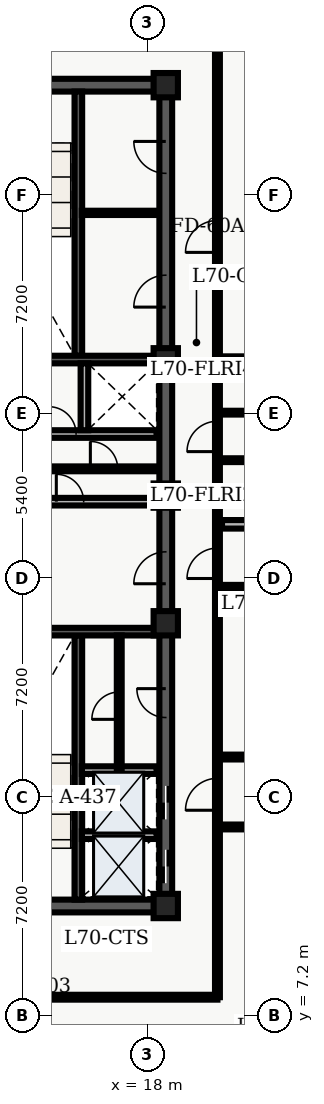
"""IFC4 building model, lengths in metres.
Left out: names, types, materials, properties, quantities, classifications, styles, units other than length and angle.
Written with IfcOpenShell. Run it as: python <this file> out.ifc"""

import sys

from ifc_helpers import new_model, entity, si_unit, converted_unit, direction, frame, origin_with_axes, origin_2d_with_axis, place, context, subcontext, project, spatial, polyline, rectangle, outline, extrude, element, fill, save


model = new_model("IFC4")
c1 = context("Model", 3, precision=1e-05, world=origin_with_axes(), true_north=direction((0.0, 1.0)))
c2 = subcontext(c1, "Body", "Model", "MODEL_VIEW")
j1 = project(units=[si_unit("LENGTHUNIT", "METRE"), converted_unit("PLANEANGLEUNIT", "DEGREE", entity("IfcPlaneAngleMeasure", 0.017), si_unit("PLANEANGLEUNIT", "RADIAN"), dimensions=[0, 0, 0, 0, 0, 0, 0])], contexts=[c1])
p1 = place(None, origin_with_axes())
s1 = spatial("IfcSite", under=j1, at=p1, CompositionType="ELEMENT")
p2 = place(p1, origin_with_axes())
s2 = spatial("IfcBuilding", under=s1, at=p2, CompositionType="ELEMENT")
p3 = place(p2, frame((0.0, 0.0, 284.1), z_axis=(0.0, 0.0, 1.0), x_axis=(1.0, 0.0, 0.0)))
s3 = spatial("IfcBuildingStorey", under=s2, at=p3, CompositionType="ELEMENT", Elevation=284.1)
p4 = place(p3, frame((11.4, 10.8, 0.0), z_axis=(0.0, 0.0, 1.0), x_axis=(1.0, 0.0, 0.0)))
e1 = element("IfcWall", 1, at=p4, inside=s3, PredefinedType="SHEAR", context=c2, shape_type="SweptSolid", body=[
    extrude(outline(polyline([(0.0, -0.21), (7.2, -0.21), (7.2, 0.21), (0.0, 0.21), (0.0, -0.21)])), origin_with_axes(), (0.0, 0.0, 1.0), 3.6),
])
p5 = place(p4, frame((2.625, 0.0, 0.0), z_axis=(0.0, 0.0, 1.0), x_axis=(1.0, 0.0, 0.0)))
e2 = element("IfcOpeningElement", 2, at=p5, cuts=e1, PredefinedType="OPENING", context=c2, shape_type="SweptSolid", body=[
    extrude(rectangle(XDim=1.05, YDim=0.44, at=origin_2d_with_axis()), origin_with_axes(), (0.0, 0.0, 1.0), 2.15),
])
p6 = place(p3, frame((11.4, 37.8, 0.0), z_axis=(0.0, 0.0, 1.0), x_axis=(1.0, 0.0, 0.0)))
e3 = element("IfcWall", 3, at=p6, inside=s3, PredefinedType="SHEAR", context=c2, shape_type="SweptSolid", body=[
    extrude(outline(polyline([(0.0, -0.21), (7.2, -0.21), (7.2, 0.21), (0.0, 0.21), (0.0, -0.21)])), origin_with_axes(), (0.0, 0.0, 1.0), 3.6),
])
p7 = place(p6, frame((2.625, 0.0, 0.0), z_axis=(0.0, 0.0, 1.0), x_axis=(1.0, 0.0, 0.0)))
e4 = element("IfcOpeningElement", 4, at=p7, cuts=e3, PredefinedType="OPENING", context=c2, shape_type="SweptSolid", body=[
    extrude(rectangle(XDim=1.05, YDim=0.44, at=origin_2d_with_axis()), origin_with_axes(), (0.0, 0.0, 1.0), 2.15),
])
p8 = place(p3, frame((18.6, 10.8, 0.0), z_axis=(0.0, 0.0, 1.0), x_axis=(0.0, 1.0, 0.0)))
e5 = element("IfcWall", 5, at=p8, inside=s3, PredefinedType="SHEAR", context=c2, shape_type="SweptSolid", body=[
    extrude(outline(polyline([(0.0, -0.21), (13.5, -0.21), (13.5, 0.21), (0.0, 0.21), (0.0, -0.21)])), origin_with_axes(), (0.0, 0.0, 1.0), 3.6),
])
p9 = place(p8, frame((1.3, 0.0, 0.0), z_axis=(0.0, 0.0, 1.0), x_axis=(1.0, 0.0, 0.0)))
e6 = element("IfcOpeningElement", 6, at=p9, cuts=e5, PredefinedType="OPENING", context=c2, shape_type="SweptSolid", body=[
    extrude(rectangle(XDim=1.1, YDim=0.44, at=origin_2d_with_axis()), origin_with_axes(), (0.0, 0.0, 1.0), 2.15),
])
p10 = place(p8, frame((3.4, 0.0, 0.0), z_axis=(0.0, 0.0, 1.0), x_axis=(1.0, 0.0, 0.0)))
e7 = element("IfcOpeningElement", 7, at=p10, cuts=e5, PredefinedType="OPENING", context=c2, shape_type="SweptSolid", body=[
    extrude(rectangle(XDim=1.1, YDim=0.44, at=origin_2d_with_axis()), origin_with_axes(), (0.0, 0.0, 1.0), 2.15),
])
p11 = place(p8, frame((11.125, 0.0, 0.0), z_axis=(0.0, 0.0, 1.0), x_axis=(1.0, 0.0, 0.0)))
e8 = element("IfcOpeningElement", 8, at=p11, cuts=e5, PredefinedType="OPENING", context=c2, shape_type="SweptSolid", body=[
    extrude(rectangle(XDim=1.05, YDim=0.44, at=origin_2d_with_axis()), origin_with_axes(), (0.0, 0.0, 1.0), 2.15),
])
p12 = place(p8, frame((6.675, 0.0, 0.0), z_axis=(0.0, 0.0, 1.0), x_axis=(1.0, 0.0, 0.0)))
e9 = element("IfcOpeningElement", 9, at=p12, cuts=e5, PredefinedType="OPENING", context=c2, shape_type="SweptSolid", body=[
    extrude(rectangle(XDim=0.95, YDim=0.44, at=origin_2d_with_axis()), origin_with_axes(), (0.0, 0.0, 1.0), 2.15),
])
p13 = place(p3, frame((18.6, 24.3, 0.0), z_axis=(0.0, 0.0, 1.0), x_axis=(0.0, 1.0, 0.0)))
e10 = element("IfcWall", 10, at=p13, inside=s3, PredefinedType="SHEAR", context=c2, shape_type="SweptSolid", body=[
    extrude(outline(polyline([(0.0, -0.21), (13.5, -0.21), (13.5, 0.21), (0.0, 0.21), (0.0, -0.21)])), origin_with_axes(), (0.0, 0.0, 1.0), 3.6),
])
p14 = place(p13, frame((6.725, 0.0, 0.0), z_axis=(0.0, 0.0, 1.0), x_axis=(1.0, 0.0, 0.0)))
e11 = element("IfcOpeningElement", 11, at=p14, cuts=e10, PredefinedType="OPENING", context=c2, shape_type="SweptSolid", body=[
    extrude(rectangle(XDim=1.05, YDim=0.44, at=origin_2d_with_axis()), origin_with_axes(), (0.0, 0.0, 1.0), 2.15),
])
p15 = place(p13, frame((11.125, 0.0, 0.0), z_axis=(0.0, 0.0, 1.0), x_axis=(1.0, 0.0, 0.0)))
e12 = element("IfcOpeningElement", 12, at=p15, cuts=e10, PredefinedType="OPENING", context=c2, shape_type="SweptSolid", body=[
    extrude(rectangle(XDim=1.05, YDim=0.44, at=origin_2d_with_axis()), origin_with_axes(), (0.0, 0.0, 1.0), 2.15),
])
p16 = place(p3, frame((15.725, 11.01, 0.0), z_axis=(0.0, 0.0, 1.0), x_axis=(0.0, 1.0, 0.0)))
e13 = element("IfcWall", 13, at=p16, inside=s3, PredefinedType="SHEAR", context=c2, shape_type="SweptSolid", body=[
    extrude(outline(polyline([(0.0, -0.125), (8.69, -0.125), (8.69, 0.125), (0.0, 0.125), (0.0, -0.125)])), origin_with_axes(), (0.0, 0.0, 1.0), 3.6),
])
p17 = place(p3, frame((11.61, 19.825, 0.0), z_axis=(0.0, 0.0, 1.0), x_axis=(1.0, 0.0, 0.0)))
e14 = element("IfcWall", 14, at=p17, inside=s3, PredefinedType="SHEAR", context=c2, shape_type="SweptSolid", body=[
    extrude(outline(polyline([(0.0, -0.125), (6.78, -0.125), (6.78, 0.125), (0.0, 0.125), (0.0, -0.125)])), origin_with_axes(), (0.0, 0.0, 1.0), 3.6),
])
p18 = place(p3, frame((15.725, 28.9, 0.0), z_axis=(0.0, 0.0, 1.0), x_axis=(0.0, 1.0, 0.0)))
e15 = element("IfcWall", 15, at=p18, inside=s3, PredefinedType="SHEAR", context=c2, shape_type="SweptSolid", body=[
    extrude(outline(polyline([(0.0, -0.125), (8.69, -0.125), (8.69, 0.125), (0.0, 0.125), (0.0, -0.125)])), origin_with_axes(), (0.0, 0.0, 1.0), 3.6),
])
p19 = place(p3, frame((11.61, 28.775, 0.0), z_axis=(0.0, 0.0, 1.0), x_axis=(1.0, 0.0, 0.0)))
e16 = element("IfcWall", 16, at=p19, inside=s3, PredefinedType="SHEAR", context=c2, shape_type="SweptSolid", body=[
    extrude(outline(polyline([(0.0, -0.125), (6.78, -0.125), (6.78, 0.125), (0.0, 0.125), (0.0, -0.125)])), origin_with_axes(), (0.0, 0.0, 1.0), 3.6),
])
p20 = place(p3, frame((11.7, 24.1, 0.0), z_axis=(0.0, 0.0, 1.0), x_axis=(1.0, 0.0, 0.0)))
e17 = element("IfcWall", 17, at=p20, inside=s3, PredefinedType="SOLIDWALL", context=c2, shape_type="SweptSolid", body=[
    extrude(outline(polyline([(0.0, -0.125), (6.6, -0.125), (6.6, 0.125), (0.0, 0.125), (0.0, -0.125)])), origin_with_axes(), (0.0, 0.0, 1.0), 2.64),
])
p21 = place(p20, frame((3.75, 0.0, 0.0), z_axis=(0.0, 0.0, 1.0), x_axis=(1.0, 0.0, 0.0)))
e18 = element("IfcOpeningElement", 18, at=p21, cuts=e17, PredefinedType="OPENING", context=c2, shape_type="SweptSolid", body=[
    extrude(rectangle(XDim=0.9, YDim=0.27, at=origin_2d_with_axis()), origin_with_axes(), (0.0, 0.0, 1.0), 2.15),
])
p22 = place(p3, frame((11.7, 26.325, 0.0), z_axis=(0.0, 0.0, 1.0), x_axis=(1.0, 0.0, 0.0)))
e19 = element("IfcWall", 19, at=p22, inside=s3, PredefinedType="SOLIDWALL", context=c2, shape_type="SweptSolid", body=[
    extrude(outline(polyline([(0.0, -0.125), (6.6, -0.125), (6.6, 0.125), (0.0, 0.125), (0.0, -0.125)])), origin_with_axes(), (0.0, 0.0, 1.0), 2.64),
])
p23 = place(p22, frame((3.5, 0.0, 0.0), z_axis=(0.0, 0.0, 1.0), x_axis=(1.0, 0.0, 0.0)))
e20 = element("IfcOpeningElement", 20, at=p23, cuts=e19, PredefinedType="OPENING", context=c2, shape_type="SweptSolid", body=[
    extrude(rectangle(XDim=0.9, YDim=0.27, at=origin_2d_with_axis()), origin_with_axes(), (0.0, 0.0, 1.0), 2.15),
])
p24 = place(p3, frame((15.925, 26.45, 0.0), z_axis=(0.0, 0.0, 1.0), x_axis=(0.0, 1.0, 0.0)))
e21 = element("IfcWall", 21, at=p24, inside=s3, PredefinedType="SOLIDWALL", context=c2, shape_type="SweptSolid", body=[
    extrude(outline(polyline([(0.0, -0.125), (2.2, -0.125), (2.2, 0.125), (0.0, 0.125), (0.0, -0.125)])), origin_with_axes(), (0.0, 0.0, 1.0), 2.64),
])
for number, where, z_axis, x_axis in (
    (22, (18.6, 10.8, 0.0), (0.0, 0.0, 1.0), (1.0, 0.0, 0.0)),
    (23, (18.6, 20.1, 0.0), (0.0, 0.0, 1.0), (1.0, 0.0, 0.0)),
    (24, (18.6, 24.3, 0.0), (0.0, 0.0, 1.0), (1.0, 0.0, 0.0)),
    (25, (18.6, 28.75, 0.0), (0.0, 0.0, 1.0), (1.0, 0.0, 0.0)),
    (26, (18.6, 37.8, 0.0), (0.0, 0.0, 1.0), (1.0, 0.0, 0.0)),
):
    element("IfcColumn", number, at=place(p3, frame(where, z_axis=z_axis, x_axis=x_axis)), inside=s3, PredefinedType="COLUMN", context=c2, shape_type="SweptSolid", body=[
        extrude(rectangle(XDim=0.8, YDim=0.8, at=origin_2d_with_axis()), origin_with_axes(), (0.0, 0.0, 1.0), 3.9),
    ])
p25 = place(p3, frame((14.62, 25.18, 0.0), z_axis=(0.0, 0.0, 1.0), x_axis=(1.0, 0.0, 0.0)))
e27 = element("IfcWall", 27, at=p25, inside=s3, PredefinedType="PARTITIONING", context=c2, shape_type="SweptSolid", body=[
    extrude(outline(polyline([(0.0, -0.08), (3.68, -0.08), (3.68, 0.08), (0.0, 0.08), (0.0, -0.08)])), origin_with_axes(), (0.0, 0.0, 1.0), 2.64),
])
p26 = place(p25, frame((1.95, 0.0, 0.0), z_axis=(0.0, 0.0, 1.0), x_axis=(1.0, 0.0, 0.0)))
e28 = element("IfcOpeningElement", 28, at=p26, cuts=e27, PredefinedType="OPENING", context=c2, shape_type="SweptSolid", body=[
    extrude(rectangle(XDim=0.9, YDim=0.18, at=origin_2d_with_axis()), origin_with_axes(), (0.0, 0.0, 1.0), 2.15),
])
for number, where, z_axis, x_axis in (
    (29, (15.84, 13.13, 0.0), (0.0, 0.0, 1.0), (1.0, 0.0, 0.0)),
    (30, (15.84, 15.27, 0.0), (0.0, 0.0, 1.0), (1.0, 0.0, 0.0)),
):
    element("IfcWall", number, at=place(p3, frame(where, z_axis=z_axis, x_axis=x_axis)), inside=s3, PredefinedType="SOLIDWALL", context=c2, shape_type="SweptSolid", body=[
        extrude(outline(polyline([(0.0, -0.125), (2.46, -0.125), (2.46, 0.125), (0.0, 0.125), (0.0, -0.125)])), origin_with_axes(), (0.0, 0.0, 1.0), 2.64),
    ])
p27 = place(p3, frame((17.07, 15.34, 0.0), z_axis=(0.0, 0.0, 1.0), x_axis=(0.0, 1.0, 0.0)))
e31 = element("IfcWall", 31, at=p27, inside=s3, PredefinedType="PARTITIONING", context=c2, shape_type="SweptSolid", body=[
    extrude(outline(polyline([(0.0, -0.08), (4.36, -0.08), (4.36, 0.08), (0.0, 0.08), (0.0, -0.08)])), origin_with_axes(), (0.0, 0.0, 1.0), 2.64),
])
p28 = place(p27, frame((2.05, 0.0, 0.0), z_axis=(0.0, 0.0, 1.0), x_axis=(1.0, 0.0, 0.0)))
e32 = element("IfcOpeningElement", 32, at=p28, cuts=e31, PredefinedType="OPENING", context=c2, shape_type="SweptSolid", body=[
    extrude(rectangle(XDim=0.9, YDim=0.18, at=origin_2d_with_axis()), origin_with_axes(), (0.0, 0.0, 1.0), 2.15),
])
p29 = place(p3, frame((15.84, 33.6, 0.0), z_axis=(0.0, 0.0, 1.0), x_axis=(1.0, 0.0, 0.0)))
e33 = element("IfcWall", 33, at=p29, inside=s3, PredefinedType="PARTITIONING", context=c2, shape_type="SweptSolid", body=[
    extrude(outline(polyline([(0.0, -0.07), (2.46, -0.07), (2.46, 0.07), (0.0, 0.07), (0.0, -0.07)])), origin_with_axes(), (0.0, 0.0, 1.0), 2.64),
])
p30 = place(p3, frame((8.135, 7.8, 0.0), z_axis=(0.0, 0.0, 1.0), x_axis=(1.0, 0.0, 0.0)))
e34 = element("IfcWall", 34, at=p30, inside=s3, PredefinedType="PARTITIONING", context=c2, shape_type="SweptSolid", body=[
    extrude(outline(polyline([(0.0, -0.08), (12.165, -0.08), (12.165, 0.08), (0.0, 0.08), (0.0, -0.08)])), origin_with_axes(), (0.0, 0.0, 1.0), 2.64),
])
p31 = place(p30, frame((6.065, 0.0, 0.0), z_axis=(0.0, 0.0, 1.0), x_axis=(1.0, 0.0, 0.0)))
e35 = element("IfcOpeningElement", 35, at=p31, cuts=e34, PredefinedType="OPENING", context=c2, shape_type="SweptSolid", body=[
    extrude(rectangle(XDim=1.0, YDim=0.18, at=origin_2d_with_axis()), origin_with_axes(), (0.0, 0.0, 1.0), 2.15),
])
p32 = place(p3, frame((20.3, 7.8, 0.0), z_axis=(0.0, 0.0, 1.0), x_axis=(0.0, 1.0, 0.0)))
e36 = element("IfcWall", 36, at=p32, inside=s3, PredefinedType="PARTITIONING", context=c2, shape_type="SweptSolid", body=[
    extrude(outline(polyline([(0.0, -0.08), (32.7, -0.08), (32.7, 0.08), (0.0, 0.08), (0.0, -0.08)])), origin_with_axes(), (0.0, 0.0, 1.0), 2.64),
])
p33 = place(p32, frame((25.025, 0.0, 0.0), z_axis=(0.0, 0.0, 1.0), x_axis=(1.0, 0.0, 0.0)))
e37 = element("IfcOpeningElement", 37, at=p33, cuts=e36, PredefinedType="OPENING", context=c2, shape_type="SweptSolid", body=[
    extrude(rectangle(XDim=1.05, YDim=0.18, at=origin_2d_with_axis()), origin_with_axes(), (0.0, 0.0, 1.0), 2.15),
])
p34 = place(p32, frame((14.273, 0.0, 0.0), z_axis=(0.0, 0.0, 1.0), x_axis=(1.0, 0.0, 0.0)))
e38 = element("IfcOpeningElement", 38, at=p34, cuts=e36, PredefinedType="OPENING", context=c2, shape_type="SweptSolid", body=[
    extrude(rectangle(XDim=1.0, YDim=0.18, at=origin_2d_with_axis()), origin_with_axes(), (0.0, 0.0, 1.0), 2.15),
])
p35 = place(p32, frame((18.447, 0.0, 0.0), z_axis=(0.0, 0.0, 1.0), x_axis=(1.0, 0.0, 0.0)))
e39 = element("IfcOpeningElement", 39, at=p35, cuts=e36, PredefinedType="OPENING", context=c2, shape_type="SweptSolid", body=[
    extrude(rectangle(XDim=1.0, YDim=0.18, at=origin_2d_with_axis()), origin_with_axes(), (0.0, 0.0, 1.0), 2.15),
])
p36 = place(p32, frame((6.675, 0.0, 0.0), z_axis=(0.0, 0.0, 1.0), x_axis=(1.0, 0.0, 0.0)))
e40 = element("IfcOpeningElement", 40, at=p36, cuts=e36, PredefinedType="OPENING", context=c2, shape_type="SweptSolid", body=[
    extrude(rectangle(XDim=1.05, YDim=0.18, at=origin_2d_with_axis()), origin_with_axes(), (0.0, 0.0, 1.0), 2.15),
])
p37 = place(p3, frame((20.3, 28.8, 0.0), z_axis=(0.0, 0.0, 1.0), x_axis=(1.0, 0.0, 0.0)))
e41 = element("IfcWall", 41, at=p37, inside=s3, PredefinedType="PARTITIONING", context=c2, shape_type="SweptSolid", body=[
    extrude(outline(polyline([(0.0, -0.08), (3.32, -0.08), (3.32, 0.08), (0.0, 0.08), (0.0, -0.08)])), origin_with_axes(), (0.0, 0.0, 1.0), 2.64),
])
p38 = place(p3, frame((20.45, 23.355, 0.0), z_axis=(0.0, 0.0, 1.0), x_axis=(1.0, 0.0, 0.0)))
e42 = element("IfcWall", 42, at=p38, inside=s3, PredefinedType="PARTITIONING", context=c2, shape_type="SweptSolid", body=[
    extrude(outline(polyline([(0.0, -0.14), (14.085, -0.14), (14.085, 0.14), (0.0, 0.14), (0.0, -0.14)])), origin_with_axes(), (0.0, 0.0, 1.0), 2.64),
])
p39 = place(p38, frame((2.975, 0.0, 0.0), z_axis=(0.0, 0.0, 1.0), x_axis=(1.0, 0.0, 0.0)))
e43 = element("IfcOpeningElement", 43, at=p39, cuts=e42, PredefinedType="OPENING", context=c2, shape_type="SweptSolid", body=[
    extrude(rectangle(XDim=0.95, YDim=0.3, at=origin_2d_with_axis()), origin_with_axes(), (0.0, 0.0, 1.0), 2.15),
])
p40 = place(p3, frame((20.45, 25.465, 0.0), z_axis=(0.0, 0.0, 1.0), x_axis=(1.0, 0.0, 0.0)))
e44 = element("IfcWall", 44, at=p40, inside=s3, PredefinedType="PARTITIONING", context=c2, shape_type="SweptSolid", body=[
    extrude(outline(polyline([(0.0, -0.062), (14.085, -0.062), (14.085, 0.062), (0.0, 0.062), (0.0, -0.062)])), origin_with_axes(), (0.0, 0.0, 1.0), 2.64),
])
p41 = place(p3, frame((20.45, 27.028, 0.0), z_axis=(0.0, 0.0, 1.0), x_axis=(1.0, 0.0, 0.0)))
e45 = element("IfcWall", 45, at=p41, inside=s3, PredefinedType="PARTITIONING", context=c2, shape_type="SweptSolid", body=[
    extrude(outline(polyline([(0.0, -0.062), (14.085, -0.062), (14.085, 0.062), (0.0, 0.062), (0.0, -0.062)])), origin_with_axes(), (0.0, 0.0, 1.0), 2.64),
])
p42 = place(p41, frame((2.975, 0.0, 0.0), z_axis=(0.0, 0.0, 1.0), x_axis=(1.0, 0.0, 0.0)))
e46 = element("IfcOpeningElement", 46, at=p42, cuts=e45, PredefinedType="OPENING", context=c2, shape_type="SweptSolid", body=[
    extrude(rectangle(XDim=0.95, YDim=0.145, at=origin_2d_with_axis()), origin_with_axes(), (0.0, 0.0, 1.0), 2.15),
])
p43 = place(p3, frame((20.3, 13.4, 0.0), z_axis=(0.0, 0.0, 1.0), x_axis=(1.0, 0.0, 0.0)))
e47 = element("IfcWall", 47, at=p43, inside=s3, PredefinedType="PARTITIONING", context=c2, shape_type="SweptSolid", body=[
    extrude(outline(polyline([(0.0, -0.08), (15.45, -0.08), (15.45, 0.08), (0.0, 0.08), (0.0, -0.08)])), origin_with_axes(), (0.0, 0.0, 1.0), 2.64),
])
p44 = place(p43, frame((2.304, 0.0, 0.0), z_axis=(0.0, 0.0, 1.0), x_axis=(1.0, 0.0, 0.0)))
e48 = element("IfcOpeningElement", 48, at=p44, cuts=e47, PredefinedType="OPENING", context=c2, shape_type="SweptSolid", body=[
    extrude(rectangle(XDim=1.0, YDim=0.18, at=origin_2d_with_axis()), origin_with_axes(), (0.0, 0.0, 1.0), 2.15),
])
p45 = place(p43, frame((6.866, 0.0, 0.0), z_axis=(0.0, 0.0, 1.0), x_axis=(1.0, 0.0, 0.0)))
e49 = element("IfcOpeningElement", 49, at=p45, cuts=e47, PredefinedType="OPENING", context=c2, shape_type="SweptSolid", body=[
    extrude(rectangle(XDim=1.0, YDim=0.18, at=origin_2d_with_axis()), origin_with_axes(), (0.0, 0.0, 1.0), 2.15),
])
p46 = place(p43, frame((12.337, 0.0, 0.0), z_axis=(0.0, 0.0, 1.0), x_axis=(1.0, 0.0, 0.0)))
e50 = element("IfcOpeningElement", 50, at=p46, cuts=e47, PredefinedType="OPENING", context=c2, shape_type="SweptSolid", body=[
    extrude(rectangle(XDim=1.2, YDim=0.18, at=origin_2d_with_axis()), origin_with_axes(), (0.0, 0.0, 1.0), 2.2),
])
p47 = place(p3, frame((20.3, 15.7, 0.0), z_axis=(0.0, 0.0, 1.0), x_axis=(1.0, 0.0, 0.0)))
e51 = element("IfcWall", 51, at=p47, inside=s3, PredefinedType="PARTITIONING", context=c2, shape_type="SweptSolid", body=[
    extrude(outline(polyline([(0.0, -0.08), (15.45, -0.08), (15.45, 0.08), (0.0, 0.08), (0.0, -0.08)])), origin_with_axes(), (0.0, 0.0, 1.0), 2.64),
])
p48 = place(p47, frame((7.775, 0.0, 0.0), z_axis=(0.0, 0.0, 1.0), x_axis=(1.0, 0.0, 0.0)))
e52 = element("IfcOpeningElement", 52, at=p48, cuts=e51, PredefinedType="OPENING", context=c2, shape_type="SweptSolid", body=[
    extrude(rectangle(XDim=1.0, YDim=0.18, at=origin_2d_with_axis()), origin_with_axes(), (0.0, 0.0, 1.0), 2.15),
])
p49 = place(p3, frame((20.3, 21.3, 0.0), z_axis=(0.0, 0.0, 1.0), x_axis=(1.0, 0.0, 0.0)))
e53 = element("IfcWall", 53, at=p49, inside=s3, PredefinedType="PARTITIONING", context=c2, shape_type="SweptSolid", body=[
    extrude(outline(polyline([(0.0, -0.062), (11.765, -0.062), (11.765, 0.062), (0.0, 0.062), (0.0, -0.062)])), origin_with_axes(), (0.0, 0.0, 1.0), 2.64),
])
p50 = place(p8, frame((1.3, 0.0, 0.0), z_axis=(0.0, 0.0, 1.0), x_axis=(1.0, 0.0, 0.0)))
e54 = element("IfcDoor", 54, at=p50, inside=s3, OperationType="SLIDING_TO_LEFT", PredefinedType="DOOR", context=c2, shape_type="SweptSolid", body=[
    extrude(rectangle(XDim=1.1, YDim=0.09, at=origin_2d_with_axis()), origin_with_axes(), (0.0, 0.0, 1.0), 2.15),
])
fill(e6, e54)
p51 = place(p8, frame((3.4, 0.0, 0.0), z_axis=(0.0, 0.0, 1.0), x_axis=(1.0, 0.0, 0.0)))
e55 = element("IfcDoor", 55, at=p51, inside=s3, OperationType="SLIDING_TO_RIGHT", PredefinedType="DOOR", context=c2, shape_type="SweptSolid", body=[
    extrude(rectangle(XDim=1.1, YDim=0.09, at=origin_2d_with_axis()), origin_with_axes(), (0.0, 0.0, 1.0), 2.15),
])
fill(e7, e55)
p52 = place(p8, frame((11.125, 0.0, 0.0), z_axis=(0.0, 0.0, 1.0), x_axis=(1.0, 0.0, 0.0)))
e56 = element("IfcDoor", 56, at=p52, inside=s3, OperationType="SINGLE_SWING_LEFT", PredefinedType="DOOR", context=c2, shape_type="SweptSolid", body=[
    extrude(rectangle(XDim=1.05, YDim=0.09, at=origin_2d_with_axis()), origin_with_axes(), (0.0, 0.0, 1.0), 2.15),
])
fill(e8, e56)
p53 = place(p22, frame((3.5, 0.0, 0.0), z_axis=(0.0, 0.0, 1.0), x_axis=(1.0, 0.0, 0.0)))
e57 = element("IfcDoor", 57, at=p53, inside=s3, OperationType="SINGLE_SWING_LEFT", PredefinedType="DOOR", context=c2, shape_type="SweptSolid", body=[
    extrude(rectangle(XDim=0.9, YDim=0.09, at=origin_2d_with_axis()), origin_with_axes(), (0.0, 0.0, 1.0), 2.15),
])
fill(e20, e57)
p54 = place(p20, frame((3.75, 0.0, 0.0), z_axis=(0.0, 0.0, 1.0), x_axis=(1.0, 0.0, 0.0)))
e58 = element("IfcDoor", 58, at=p54, inside=s3, OperationType="SINGLE_SWING_LEFT", PredefinedType="DOOR", context=c2, shape_type="SweptSolid", body=[
    extrude(rectangle(XDim=0.9, YDim=0.09, at=origin_2d_with_axis()), origin_with_axes(), (0.0, 0.0, 1.0), 2.15),
])
fill(e18, e58)
p55 = place(p25, frame((1.95, 0.0, 0.0), z_axis=(0.0, 0.0, 1.0), x_axis=(1.0, 0.0, 0.0)))
e59 = element("IfcDoor", 59, at=p55, inside=s3, OperationType="SINGLE_SWING_LEFT", PredefinedType="DOOR", context=c2, shape_type="SweptSolid", body=[
    extrude(rectangle(XDim=0.9, YDim=0.09, at=origin_2d_with_axis()), origin_with_axes(), (0.0, 0.0, 1.0), 2.15),
])
fill(e28, e59)
p56 = place(p27, frame((2.05, 0.0, 0.0), z_axis=(0.0, 0.0, 1.0), x_axis=(1.0, 0.0, 0.0)))
e60 = element("IfcDoor", 60, at=p56, inside=s3, OperationType="SINGLE_SWING_LEFT", PredefinedType="DOOR", context=c2, shape_type="SweptSolid", body=[
    extrude(rectangle(XDim=0.9, YDim=0.09, at=origin_2d_with_axis()), origin_with_axes(), (0.0, 0.0, 1.0), 2.15),
])
fill(e32, e60)
p57 = place(p8, frame((6.675, 0.0, 0.0), z_axis=(0.0, 0.0, 1.0), x_axis=(1.0, 0.0, 0.0)))
e61 = element("IfcDoor", 61, at=p57, inside=s3, OperationType="SINGLE_SWING_RIGHT", PredefinedType="DOOR", context=c2, shape_type="SweptSolid", body=[
    extrude(rectangle(XDim=0.95, YDim=0.09, at=origin_2d_with_axis()), origin_with_axes(), (0.0, 0.0, 1.0), 2.15),
])
fill(e9, e61)
p58 = place(p13, frame((6.725, 0.0, 0.0), z_axis=(0.0, 0.0, 1.0), x_axis=(1.0, 0.0, 0.0)))
e62 = element("IfcDoor", 62, at=p58, inside=s3, OperationType="SINGLE_SWING_LEFT", PredefinedType="DOOR", context=c2, shape_type="SweptSolid", body=[
    extrude(rectangle(XDim=1.05, YDim=0.09, at=origin_2d_with_axis()), origin_with_axes(), (0.0, 0.0, 1.0), 2.15),
])
fill(e11, e62)
p59 = place(p13, frame((11.125, 0.0, 0.0), z_axis=(0.0, 0.0, 1.0), x_axis=(1.0, 0.0, 0.0)))
e63 = element("IfcDoor", 63, at=p59, inside=s3, OperationType="SINGLE_SWING_RIGHT", PredefinedType="DOOR", context=c2, shape_type="SweptSolid", body=[
    extrude(rectangle(XDim=1.05, YDim=0.09, at=origin_2d_with_axis()), origin_with_axes(), (0.0, 0.0, 1.0), 2.15),
])
fill(e12, e63)
p60 = place(p32, frame((25.025, 0.0, 0.0), z_axis=(0.0, 0.0, 1.0), x_axis=(1.0, 0.0, 0.0)))
e64 = element("IfcDoor", 64, at=p60, inside=s3, OperationType="SINGLE_SWING_LEFT", PredefinedType="DOOR", context=c2, shape_type="SweptSolid", body=[
    extrude(rectangle(XDim=1.05, YDim=0.09, at=origin_2d_with_axis()), origin_with_axes(), (0.0, 0.0, 1.0), 2.15),
])
fill(e37, e64)
p61 = place(p32, frame((14.273, 0.0, 0.0), z_axis=(0.0, 0.0, 1.0), x_axis=(1.0, 0.0, 0.0)))
e65 = element("IfcDoor", 65, at=p61, inside=s3, OperationType="SINGLE_SWING_LEFT", PredefinedType="DOOR", context=c2, shape_type="SweptSolid", body=[
    extrude(rectangle(XDim=1.0, YDim=0.09, at=origin_2d_with_axis()), origin_with_axes(), (0.0, 0.0, 1.0), 2.15),
])
fill(e38, e65)
p62 = place(p32, frame((18.447, 0.0, 0.0), z_axis=(0.0, 0.0, 1.0), x_axis=(1.0, 0.0, 0.0)))
e66 = element("IfcDoor", 66, at=p62, inside=s3, OperationType="SINGLE_SWING_LEFT", PredefinedType="DOOR", context=c2, shape_type="SweptSolid", body=[
    extrude(rectangle(XDim=1.0, YDim=0.09, at=origin_2d_with_axis()), origin_with_axes(), (0.0, 0.0, 1.0), 2.15),
])
fill(e39, e66)
p63 = place(p32, frame((6.675, 0.0, 0.0), z_axis=(0.0, 0.0, 1.0), x_axis=(1.0, 0.0, 0.0)))
e67 = element("IfcDoor", 67, at=p63, inside=s3, OperationType="SINGLE_SWING_LEFT", PredefinedType="DOOR", context=c2, shape_type="SweptSolid", body=[
    extrude(rectangle(XDim=1.05, YDim=0.09, at=origin_2d_with_axis()), origin_with_axes(), (0.0, 0.0, 1.0), 2.15),
])
fill(e40, e67)
save(model, sys.argv[1])
